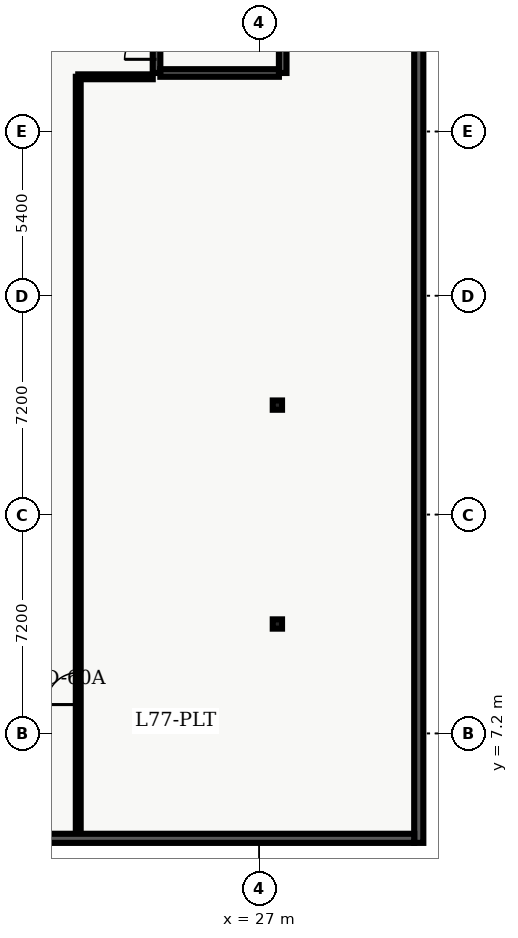
"""IFC4 building model, lengths in metres.
Left out: names, types, materials, properties, quantities, classifications, styles, units other than length and angle.
Written with IfcOpenShell. Run it as: python <this file> out.ifc"""

import sys

from ifc_helpers import new_model, entity, si_unit, converted_unit, direction, frame, origin_with_axes, origin_2d_with_axis, place, context, subcontext, project, spatial, polyline, rectangle, hollow_rectangle, outline, extrude, element, fill, save


model = new_model("IFC4")
c1 = context("Model", 3, precision=1e-05, world=origin_with_axes(), true_north=direction((0.0, 1.0)))
c2 = subcontext(c1, "Body", "Model", "MODEL_VIEW")
j1 = project(units=[si_unit("LENGTHUNIT", "METRE"), converted_unit("PLANEANGLEUNIT", "DEGREE", entity("IfcPlaneAngleMeasure", 0.017), si_unit("PLANEANGLEUNIT", "RADIAN"), dimensions=[0, 0, 0, 0, 0, 0, 0])], contexts=[c1])
p1 = place(None, origin_with_axes())
s1 = spatial("IfcSite", under=j1, at=p1, CompositionType="ELEMENT")
p2 = place(p1, origin_with_axes())
s2 = spatial("IfcBuilding", under=s1, at=p2, CompositionType="ELEMENT")
p3 = place(p2, frame((0.0, 0.0, 312.6), z_axis=(0.0, 0.0, 1.0), x_axis=(1.0, 0.0, 0.0)))
s3 = spatial("IfcBuildingStorey", under=s2, at=p3, CompositionType="ELEMENT", Elevation=312.6)
p4 = place(p3, frame((23.625, 28.925, 0.0), z_axis=(0.0, 0.0, 1.0), x_axis=(0.0, 1.0, 0.0)))
e1 = element("IfcWall", 1, at=p4, inside=s3, PredefinedType="SHEAR", context=c2, shape_type="SweptSolid", body=[
    extrude(outline(polyline([(0.0, -0.125), (8.65, -0.125), (8.65, 0.125), (0.0, 0.125), (0.0, -0.125)])), origin_with_axes(), (0.0, 0.0, 1.0), 3.64),
])
p5 = place(p4, frame((0.975, 0.0, 0.0), z_axis=(0.0, 0.0, 1.0), x_axis=(1.0, 0.0, 0.0)))
e2 = element("IfcOpeningElement", 2, at=p5, cuts=e1, PredefinedType="OPENING", context=c2, shape_type="SweptSolid", body=[
    extrude(rectangle(XDim=1.05, YDim=0.27, at=origin_2d_with_axis()), origin_with_axes(), (0.0, 0.0, 1.0), 2.15),
])
p6 = place(p3, frame((27.775, 28.925, 0.0), z_axis=(0.0, 0.0, 1.0), x_axis=(0.0, 1.0, 0.0)))
e3 = element("IfcWall", 3, at=p6, inside=s3, PredefinedType="SHEAR", context=c2, shape_type="SweptSolid", body=[
    extrude(outline(polyline([(0.0, -0.125), (8.65, -0.125), (8.65, 0.125), (0.0, 0.125), (0.0, -0.125)])), origin_with_axes(), (0.0, 0.0, 1.0), 3.64),
])
p7 = place(p3, frame((23.75, 28.925, 0.0), z_axis=(0.0, 0.0, 1.0), x_axis=(1.0, 0.0, 0.0)))
e4 = element("IfcWall", 4, at=p7, inside=s3, PredefinedType="SHEAR", context=c2, shape_type="SweptSolid", body=[
    extrude(outline(polyline([(0.0, -0.125), (3.9, -0.125), (3.9, 0.125), (0.0, 0.125), (0.0, -0.125)])), origin_with_axes(), (0.0, 0.0, 1.0), 3.64),
])
for number, where, z_axis, x_axis in (
    (5, (27.6, 10.8, 0.0), (0.0, 0.0, 1.0), (1.0, 0.0, 0.0)),
    (6, (27.6, 18.0, 0.0), (0.0, 0.0, 1.0), (1.0, 0.0, 0.0)),
):
    element("IfcColumn", number, at=place(p3, frame(where, z_axis=z_axis, x_axis=x_axis)), inside=s3, PredefinedType="COLUMN", context=c2, shape_type="SweptSolid", body=[
        extrude(hollow_rectangle(XDim=0.305, YDim=0.305, WallThickness=0.015, InnerFilletRadius=0.015, OuterFilletRadius=0.03, at=origin_2d_with_axis()), origin_with_axes(), (0.0, 0.0, 1.0), 3.9),
    ])
p8 = place(p3, frame((21.05, 3.895, 0.0), z_axis=(0.0, 0.0, 1.0), x_axis=(0.0, 1.0, 0.0)))
e7 = element("IfcWall", 7, at=p8, inside=s3, PredefinedType="PARTITIONING", context=c2, shape_type="SweptSolid", body=[
    extrude(outline(polyline([(0.0, -0.08), (24.905, -0.08), (24.905, 0.08), (0.0, 0.08), (0.0, -0.08)])), origin_with_axes(), (0.0, 0.0, 1.0), 2.68),
])
p9 = place(p8, frame((4.78, 0.0, 0.0), z_axis=(0.0, 0.0, 1.0), x_axis=(1.0, 0.0, 0.0)))
e8 = element("IfcOpeningElement", 8, at=p9, cuts=e7, PredefinedType="OPENING", context=c2, shape_type="SweptSolid", body=[
    extrude(rectangle(XDim=1.05, YDim=0.18, at=origin_2d_with_axis()), origin_with_axes(), (0.0, 0.0, 1.0), 2.15),
])
p10 = place(p3, frame((21.05, 28.8, 0.0), z_axis=(0.0, 0.0, 1.0), x_axis=(1.0, 0.0, 0.0)))
e9 = element("IfcWall", 9, at=p10, inside=s3, PredefinedType="PARTITIONING", context=c2, shape_type="SweptSolid", body=[
    extrude(outline(polyline([(0.0, -0.08), (2.45, -0.08), (2.45, 0.08), (0.0, 0.08), (0.0, -0.08)])), origin_with_axes(), (0.0, 0.0, 1.0), 2.68),
])
p11 = place(p3, frame((32.25, 31.0, 0.0), z_axis=(0.0, 0.0, 1.0), x_axis=(0.0, -1.0, 0.0)))
e10 = element("IfcWall", 10, at=p11, inside=s3, PredefinedType="SOLIDWALL", context=c2, shape_type="SweptSolid", body=[
    extrude(outline(polyline([(0.0, -0.15), (27.4, -0.15), (27.4, 0.15), (0.0, 0.15), (0.0, -0.15)])), origin_with_axes(), (0.0, 0.0, 1.0), 3.64),
])
p12 = place(p3, frame((32.1, 3.75, 0.0), z_axis=(0.0, 0.0, 1.0), x_axis=(-1.0, 0.0, 0.0)))
e11 = element("IfcWall", 11, at=p12, inside=s3, PredefinedType="SOLIDWALL", context=c2, shape_type="SweptSolid", body=[
    extrude(outline(polyline([(0.0, -0.15), (22.5, -0.15), (22.5, 0.15), (0.0, 0.15), (0.0, -0.15)])), origin_with_axes(), (0.0, 0.0, 1.0), 3.64),
])
p13 = place(p4, frame((0.975, 0.0, 0.0), z_axis=(0.0, 0.0, 1.0), x_axis=(1.0, 0.0, 0.0)))
e12 = element("IfcDoor", 12, at=p13, inside=s3, OperationType="SINGLE_SWING_LEFT", PredefinedType="DOOR", context=c2, shape_type="SweptSolid", body=[
    extrude(rectangle(XDim=1.05, YDim=0.09, at=origin_2d_with_axis()), origin_with_axes(), (0.0, 0.0, 1.0), 2.15),
])
fill(e2, e12)
p14 = place(p8, frame((4.78, 0.0, 0.0), z_axis=(0.0, 0.0, 1.0), x_axis=(1.0, 0.0, 0.0)))
e13 = element("IfcDoor", 13, at=p14, inside=s3, OperationType="SINGLE_SWING_LEFT", PredefinedType="DOOR", context=c2, shape_type="SweptSolid", body=[
    extrude(rectangle(XDim=1.05, YDim=0.09, at=origin_2d_with_axis()), origin_with_axes(), (0.0, 0.0, 1.0), 2.15),
])
fill(e8, e13)
save(model, sys.argv[1])
